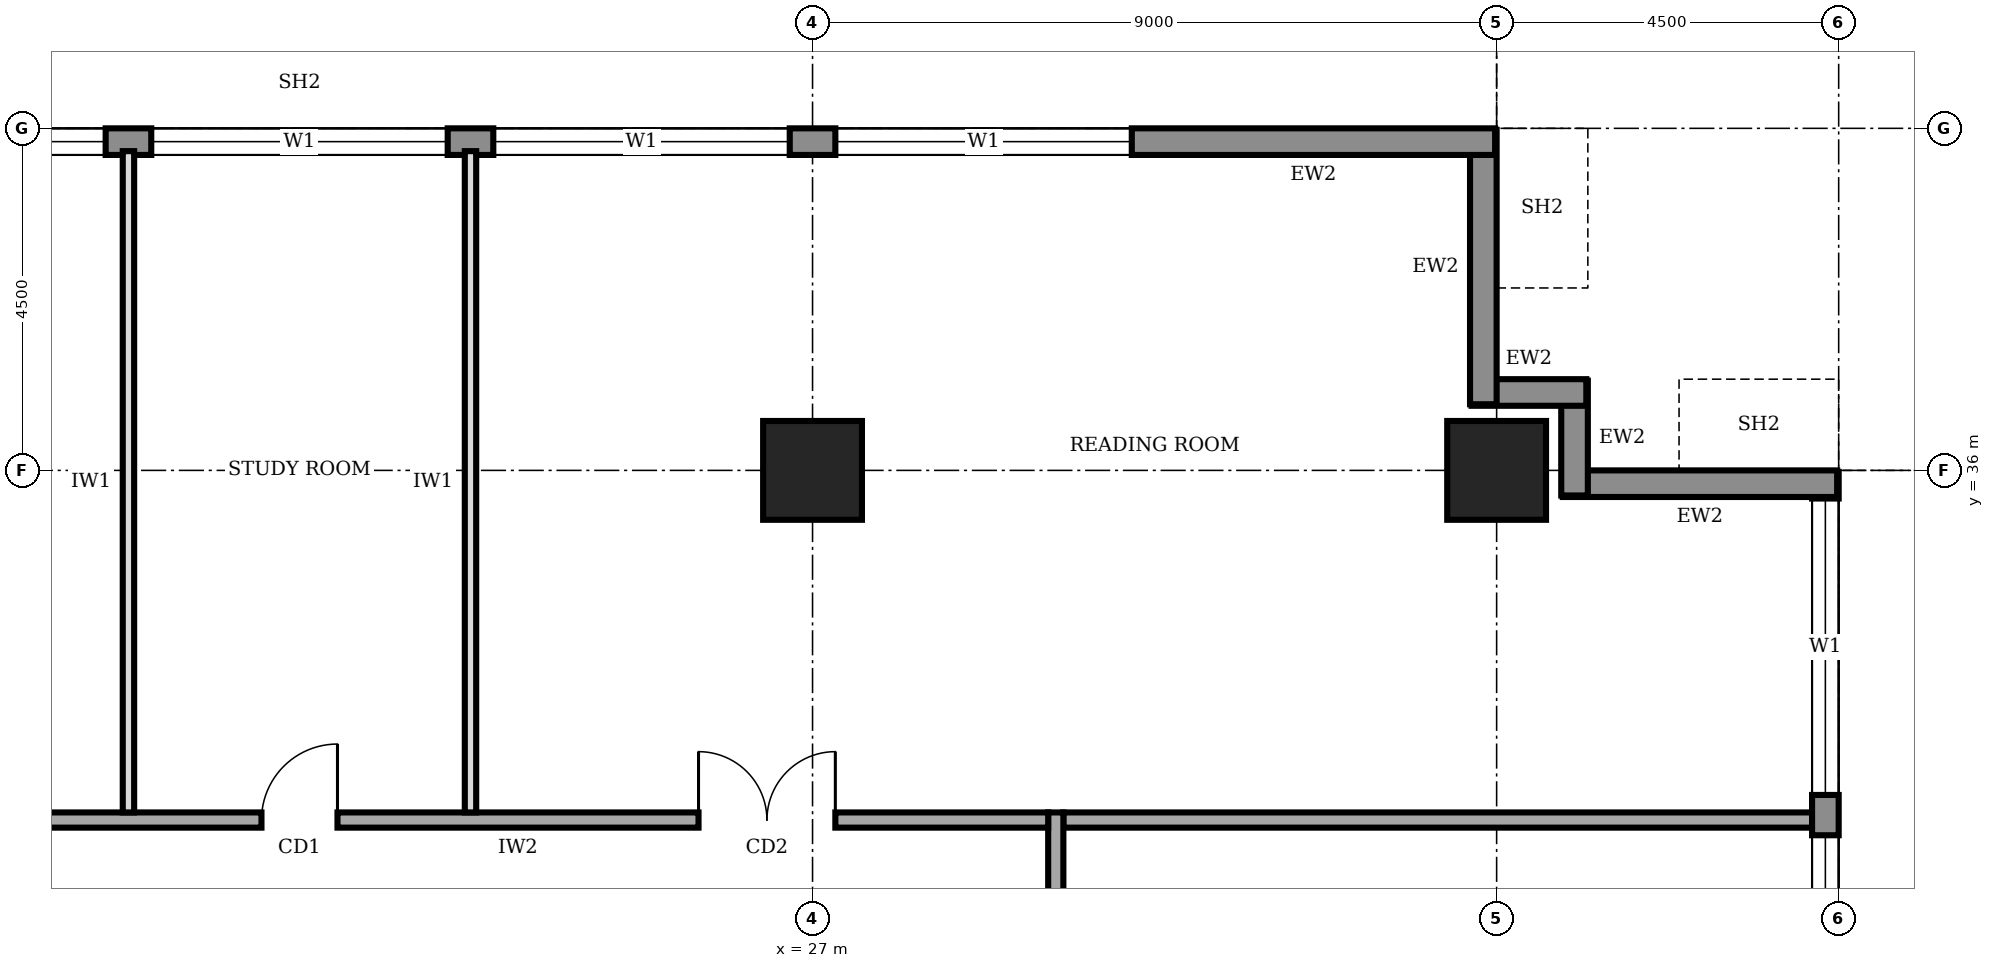
"""IFC4 building model, lengths in metres.
Left out: names, types, materials, properties, quantities, classifications, styles, units other than length and angle.
Written with IfcOpenShell. Run it as: python <this file> out.ifc"""

import sys

from ifc_helpers import new_model, si_unit, direction, frame, frame_2d, origin, origin_2d, place, context, subcontext, project, spatial, rectangle, extrude, element, fill, save


model = new_model("IFC4")
c1 = context("Model", 3, precision=1e-05, world=origin(), true_north=direction((0.0, 1.0)))
c2 = subcontext(c1, "Body", "Model", "MODEL_VIEW")
j1 = project(units=[si_unit("LENGTHUNIT", "METRE"), si_unit("PLANEANGLEUNIT", "RADIAN")], contexts=[c1])
p1 = place(None, origin())
s1 = spatial("IfcSite", under=j1, at=p1, CompositionType="ELEMENT")
p2 = place(p1, origin())
s2 = spatial("IfcBuilding", under=s1, at=p2, CompositionType="ELEMENT")
p3 = place(p2, frame((0.0, 0.0, 285.0)))
s3 = spatial("IfcBuildingStorey", under=s2, at=p3, CompositionType="ELEMENT", Elevation=285.0)
for number, where, z_axis, x_axis in (
    (1, (27.0, 36.0, 0.0), (0.0, 0.0, 1.0), (1.0, 0.0, 0.0)),
    (2, (36.0, 36.0, 0.0), (0.0, 0.0, 1.0), (1.0, 0.0, 0.0)),
):
    element("IfcColumn", number, at=place(p3, frame(where, z_axis=z_axis, x_axis=x_axis)), inside=s3, PredefinedType="COLUMN", context=c2, shape_type="SweptSolid", body=[
        extrude(rectangle(XDim=1.3, YDim=1.3, at=origin_2d()), origin(), (0.0, 0.0, 1.0), 4.0),
    ])
p4 = place(p3, frame((40.325, 4.52, 0.0), z_axis=(0.0, 0.0, 1.0), x_axis=(0.0, 1.0, 0.0)))
e3 = element("IfcWall", 3, at=p4, inside=s3, PredefinedType="STANDARD", context=c2, shape_type="SweptSolid", body=[
    extrude(rectangle(XDim=31.46, YDim=0.35, at=frame_2d((15.73, 0.0))), origin(), (0.0, 0.0, 1.0), 3.75),
])
p5 = place(p4, frame((4.78, 0.0, 0.9)))
e4 = element("IfcOpeningElement", 4, at=p5, cuts=e3, PredefinedType="OPENING", context=c2, shape_type="SweptSolid", body=[
    extrude(rectangle(XDim=3.9, YDim=2.2, at=frame_2d((1.95, 1.1))), frame((0.0, 0.185, 0.0), z_axis=(0.0, -1.0, 0.0), x_axis=(1.0, 0.0, 0.0)), (0.0, 0.0, 1.0), 0.37),
])
p6 = place(p4, frame((9.28, 0.0, 0.9)))
e5 = element("IfcOpeningElement", 5, at=p6, cuts=e3, PredefinedType="OPENING", context=c2, shape_type="SweptSolid", body=[
    extrude(rectangle(XDim=3.9, YDim=2.2, at=frame_2d((1.95, 1.1))), frame((0.0, 0.185, 0.0), z_axis=(0.0, -1.0, 0.0), x_axis=(1.0, 0.0, 0.0)), (0.0, 0.0, 1.0), 0.37),
])
p7 = place(p4, frame((13.78, 0.0, 0.9)))
e6 = element("IfcOpeningElement", 6, at=p7, cuts=e3, PredefinedType="OPENING", context=c2, shape_type="SweptSolid", body=[
    extrude(rectangle(XDim=3.9, YDim=2.2, at=frame_2d((1.95, 1.1))), frame((0.0, 0.185, 0.0), z_axis=(0.0, -1.0, 0.0), x_axis=(1.0, 0.0, 0.0)), (0.0, 0.0, 1.0), 0.37),
])
p8 = place(p4, frame((18.28, 0.0, 0.9)))
e7 = element("IfcOpeningElement", 7, at=p8, cuts=e3, PredefinedType="OPENING", context=c2, shape_type="SweptSolid", body=[
    extrude(rectangle(XDim=3.9, YDim=2.2, at=frame_2d((1.95, 1.1))), frame((0.0, 0.185, 0.0), z_axis=(0.0, -1.0, 0.0), x_axis=(1.0, 0.0, 0.0)), (0.0, 0.0, 1.0), 0.37),
])
p9 = place(p4, frame((22.78, 0.0, 0.9)))
e8 = element("IfcOpeningElement", 8, at=p9, cuts=e3, PredefinedType="OPENING", context=c2, shape_type="SweptSolid", body=[
    extrude(rectangle(XDim=3.9, YDim=2.2, at=frame_2d((1.95, 1.1))), frame((0.0, 0.185, 0.0), z_axis=(0.0, -1.0, 0.0), x_axis=(1.0, 0.0, 0.0)), (0.0, 0.0, 1.0), 0.37),
])
p10 = place(p4, frame((27.21, 0.0, 0.9)))
e9 = element("IfcOpeningElement", 9, at=p10, cuts=e3, PredefinedType="OPENING", context=c2, shape_type="SweptSolid", body=[
    extrude(rectangle(XDim=3.9, YDim=2.2, at=frame_2d((1.95, 1.1))), frame((0.0, 0.185, 0.0), z_axis=(0.0, -1.0, 0.0), x_axis=(1.0, 0.0, 0.0)), (0.0, 0.0, 1.0), 0.37),
])
p11 = place(p3, frame((40.48, 35.825, 0.0), z_axis=(0.0, 0.0, 1.0), x_axis=(-1.0, 0.0, 0.0)))
e10 = element("IfcWall", 10, at=p11, inside=s3, PredefinedType="STANDARD", context=c2, shape_type="SweptSolid", body=[
    extrude(rectangle(XDim=3.61, YDim=0.35, at=frame_2d((1.805, 0.0))), origin(), (0.0, 0.0, 1.0), 2.65),
])
for number, where, z_axis, x_axis in (
    (11, (37.025, 35.67, 0.0), (0.0, 0.0, 1.0), (0.0, 1.0, 0.0)),
    (12, (37.18, 37.025, 0.0), (0.0, 0.0, 1.0), (-1.0, 0.0, 0.0)),
):
    element("IfcWall", number, at=place(p3, frame(where, z_axis=z_axis, x_axis=x_axis)), inside=s3, PredefinedType="STANDARD", context=c2, shape_type="SweptSolid", body=[
        extrude(rectangle(XDim=1.51, YDim=0.35, at=frame_2d((0.755, 0.0))), origin(), (0.0, 0.0, 1.0), 3.75),
    ])
p12 = place(p3, frame((35.825, 36.87, 0.0), z_axis=(0.0, 0.0, 1.0), x_axis=(0.0, 1.0, 0.0)))
e13 = element("IfcWall", 13, at=p12, inside=s3, PredefinedType="STANDARD", context=c2, shape_type="SweptSolid", body=[
    extrude(rectangle(XDim=3.61, YDim=0.35, at=frame_2d((1.805, 0.0))), origin(), (0.0, 0.0, 1.0), 2.65),
])
p13 = place(p3, frame((35.98, 40.325, 0.0), z_axis=(0.0, 0.0, 1.0), x_axis=(-1.0, 0.0, 0.0)))
e14 = element("IfcWall", 14, at=p13, inside=s3, PredefinedType="STANDARD", context=c2, shape_type="SweptSolid", body=[
    extrude(rectangle(XDim=31.46, YDim=0.35, at=frame_2d((15.73, 0.0))), origin(), (0.0, 0.0, 1.0), 3.75),
])
p14 = place(p13, frame((27.21, 0.0, 0.9)))
e15 = element("IfcOpeningElement", 15, at=p14, cuts=e14, PredefinedType="OPENING", context=c2, shape_type="SweptSolid", body=[
    extrude(rectangle(XDim=3.9, YDim=2.2, at=frame_2d((1.95, 1.1))), frame((0.0, 0.185, 0.0), z_axis=(0.0, -1.0, 0.0), x_axis=(1.0, 0.0, 0.0)), (0.0, 0.0, 1.0), 0.37),
])
p15 = place(p13, frame((22.78, 0.0, 0.9)))
e16 = element("IfcOpeningElement", 16, at=p15, cuts=e14, PredefinedType="OPENING", context=c2, shape_type="SweptSolid", body=[
    extrude(rectangle(XDim=3.9, YDim=2.2, at=frame_2d((1.95, 1.1))), frame((0.0, 0.185, 0.0), z_axis=(0.0, -1.0, 0.0), x_axis=(1.0, 0.0, 0.0)), (0.0, 0.0, 1.0), 0.37),
])
p16 = place(p13, frame((18.28, 0.0, 0.9)))
e17 = element("IfcOpeningElement", 17, at=p16, cuts=e14, PredefinedType="OPENING", context=c2, shape_type="SweptSolid", body=[
    extrude(rectangle(XDim=3.9, YDim=2.2, at=frame_2d((1.95, 1.1))), frame((0.0, 0.185, 0.0), z_axis=(0.0, -1.0, 0.0), x_axis=(1.0, 0.0, 0.0)), (0.0, 0.0, 1.0), 0.37),
])
p17 = place(p13, frame((13.78, 0.0, 0.9)))
e18 = element("IfcOpeningElement", 18, at=p17, cuts=e14, PredefinedType="OPENING", context=c2, shape_type="SweptSolid", body=[
    extrude(rectangle(XDim=3.9, YDim=2.2, at=frame_2d((1.95, 1.1))), frame((0.0, 0.185, 0.0), z_axis=(0.0, -1.0, 0.0), x_axis=(1.0, 0.0, 0.0)), (0.0, 0.0, 1.0), 0.37),
])
p18 = place(p13, frame((9.28, 0.0, 0.9)))
e19 = element("IfcOpeningElement", 19, at=p18, cuts=e14, PredefinedType="OPENING", context=c2, shape_type="SweptSolid", body=[
    extrude(rectangle(XDim=3.9, YDim=2.2, at=frame_2d((1.95, 1.1))), frame((0.0, 0.185, 0.0), z_axis=(0.0, -1.0, 0.0), x_axis=(1.0, 0.0, 0.0)), (0.0, 0.0, 1.0), 0.37),
])
p19 = place(p13, frame((4.78, 0.0, 0.9)))
e20 = element("IfcOpeningElement", 20, at=p19, cuts=e14, PredefinedType="OPENING", context=c2, shape_type="SweptSolid", body=[
    extrude(rectangle(XDim=3.9, YDim=2.2, at=frame_2d((1.95, 1.1))), frame((0.0, 0.185, 0.0), z_axis=(0.0, -1.0, 0.0), x_axis=(1.0, 0.0, 0.0)), (0.0, 0.0, 1.0), 0.37),
])
p20 = place(p3, frame((30.2, 9.2, 0.0), z_axis=(0.0, 0.0, 1.0), x_axis=(0.0, 1.0, 0.0)))
e21 = element("IfcWall", 21, at=p20, inside=s3, PredefinedType="SOLIDWALL", context=c2, shape_type="SweptSolid", body=[
    extrude(rectangle(XDim=22.3, YDim=0.2, at=frame_2d((11.15, 0.0))), origin(), (0.0, 0.0, 1.0), 3.75),
])
p21 = place(p20, frame((5.65, 0.0, 0.0)))
e22 = element("IfcOpeningElement", 22, at=p21, cuts=e21, PredefinedType="OPENING", context=c2, shape_type="SweptSolid", body=[
    extrude(rectangle(XDim=1.8, YDim=2.1, at=frame_2d((0.9, 1.05))), frame((0.0, 0.11, 0.0), z_axis=(0.0, -1.0, 0.0), x_axis=(1.0, 0.0, 0.0)), (0.0, 0.0, 1.0), 0.22),
])
p22 = place(p20, frame((17.3, 0.0, 0.0)))
e23 = element("IfcOpeningElement", 23, at=p22, cuts=e21, PredefinedType="OPENING", context=c2, shape_type="SweptSolid", body=[
    extrude(rectangle(XDim=1.0, YDim=2.1, at=frame_2d((0.5, 1.05))), frame((0.0, 0.11, 0.0), z_axis=(0.0, -1.0, 0.0), x_axis=(1.0, 0.0, 0.0)), (0.0, 0.0, 1.0), 0.22),
])
p23 = place(p3, frame((30.1, 31.4, 0.0), z_axis=(0.0, 0.0, 1.0), x_axis=(-1.0, 0.0, 0.0)))
e24 = element("IfcWall", 24, at=p23, inside=s3, PredefinedType="SOLIDWALL", context=c2, shape_type="SweptSolid", body=[
    extrude(rectangle(XDim=18.4, YDim=0.2, at=frame_2d((9.2, 0.0))), origin(), (0.0, 0.0, 1.0), 3.75),
])
p24 = place(p23, frame((14.35, 0.0, 0.0)))
e25 = element("IfcOpeningElement", 25, at=p24, cuts=e24, PredefinedType="OPENING", context=c2, shape_type="SweptSolid", body=[
    extrude(rectangle(XDim=1.8, YDim=2.1, at=frame_2d((0.9, 1.05))), frame((0.0, 0.11, 0.0), z_axis=(0.0, -1.0, 0.0), x_axis=(1.0, 0.0, 0.0)), (0.0, 0.0, 1.0), 0.22),
])
p25 = place(p23, frame((9.35, 0.0, 0.0)))
e26 = element("IfcOpeningElement", 26, at=p25, cuts=e24, PredefinedType="OPENING", context=c2, shape_type="SweptSolid", body=[
    extrude(rectangle(XDim=1.0, YDim=2.1, at=frame_2d((0.5, 1.05))), frame((0.0, 0.11, 0.0), z_axis=(0.0, -1.0, 0.0), x_axis=(1.0, 0.0, 0.0)), (0.0, 0.0, 1.0), 0.22),
])
p26 = place(p23, frame((2.8, 0.0, 0.0)))
e27 = element("IfcOpeningElement", 27, at=p26, cuts=e24, PredefinedType="OPENING", context=c2, shape_type="SweptSolid", body=[
    extrude(rectangle(XDim=1.8, YDim=2.1, at=frame_2d((0.9, 1.05))), frame((0.0, 0.11, 0.0), z_axis=(0.0, -1.0, 0.0), x_axis=(1.0, 0.0, 0.0)), (0.0, 0.0, 1.0), 0.22),
])
p27 = place(p3, frame((30.3, 31.4, 0.0), z_axis=(0.0, 0.0, 1.0), x_axis=(1.0, 0.0, 0.0)))
e28 = element("IfcWall", 28, at=p27, inside=s3, PredefinedType="SOLIDWALL", context=c2, shape_type="SweptSolid", body=[
    extrude(rectangle(XDim=9.9, YDim=0.2, at=frame_2d((4.95, 0.0))), origin(), (0.0, 0.0, 1.0), 3.75),
])
for number, where, z_axis, x_axis in (
    (29, (18.0, 31.5, 0.0), (0.0, 0.0, 1.0), (0.0, 1.0, 0.0)),
    (30, (22.5, 31.5, 0.0), (0.0, 0.0, 1.0), (0.0, 1.0, 0.0)),
):
    element("IfcWall", number, at=place(p3, frame(where, z_axis=z_axis, x_axis=x_axis)), inside=s3, PredefinedType="PARTITIONING", context=c2, shape_type="SweptSolid", body=[
        extrude(rectangle(XDim=8.7, YDim=0.15, at=frame_2d((4.35, 0.0))), origin(), (0.0, 0.0, 1.0), 3.75),
    ])
p28 = place(p9, origin())
e31 = element("IfcWindow", 31, at=p28, inside=s3, PartitioningType="SINGLE_PANEL", PredefinedType="WINDOW", context=c2, shape_type="SweptSolid", body=[
    extrude(rectangle(XDim=3.9, YDim=2.2, at=frame_2d((1.95, 1.1))), frame((0.0, 0.03, 0.0), z_axis=(0.0, -1.0, 0.0), x_axis=(1.0, 0.0, 0.0)), (0.0, 0.0, 1.0), 0.06),
])
fill(e8, e31)
p29 = place(p10, origin())
e32 = element("IfcWindow", 32, at=p29, inside=s3, PartitioningType="SINGLE_PANEL", PredefinedType="WINDOW", context=c2, shape_type="SweptSolid", body=[
    extrude(rectangle(XDim=3.9, YDim=2.2, at=frame_2d((1.95, 1.1))), frame((0.0, 0.03, 0.0), z_axis=(0.0, -1.0, 0.0), x_axis=(1.0, 0.0, 0.0)), (0.0, 0.0, 1.0), 0.06),
])
fill(e9, e32)
p30 = place(p16, origin())
e33 = element("IfcWindow", 33, at=p30, inside=s3, PartitioningType="SINGLE_PANEL", PredefinedType="WINDOW", context=c2, shape_type="SweptSolid", body=[
    extrude(rectangle(XDim=3.9, YDim=2.2, at=frame_2d((1.95, 1.1))), frame((0.0, 0.03, 0.0), z_axis=(0.0, -1.0, 0.0), x_axis=(1.0, 0.0, 0.0)), (0.0, 0.0, 1.0), 0.06),
])
fill(e17, e33)
p31 = place(p17, origin())
e34 = element("IfcWindow", 34, at=p31, inside=s3, PartitioningType="SINGLE_PANEL", PredefinedType="WINDOW", context=c2, shape_type="SweptSolid", body=[
    extrude(rectangle(XDim=3.9, YDim=2.2, at=frame_2d((1.95, 1.1))), frame((0.0, 0.03, 0.0), z_axis=(0.0, -1.0, 0.0), x_axis=(1.0, 0.0, 0.0)), (0.0, 0.0, 1.0), 0.06),
])
fill(e18, e34)
p32 = place(p18, origin())
e35 = element("IfcWindow", 35, at=p32, inside=s3, PartitioningType="SINGLE_PANEL", PredefinedType="WINDOW", context=c2, shape_type="SweptSolid", body=[
    extrude(rectangle(XDim=3.9, YDim=2.2, at=frame_2d((1.95, 1.1))), frame((0.0, 0.03, 0.0), z_axis=(0.0, -1.0, 0.0), x_axis=(1.0, 0.0, 0.0)), (0.0, 0.0, 1.0), 0.06),
])
fill(e19, e35)
p33 = place(p19, origin())
e36 = element("IfcWindow", 36, at=p33, inside=s3, PartitioningType="SINGLE_PANEL", PredefinedType="WINDOW", context=c2, shape_type="SweptSolid", body=[
    extrude(rectangle(XDim=3.9, YDim=2.2, at=frame_2d((1.95, 1.1))), frame((0.0, 0.03, 0.0), z_axis=(0.0, -1.0, 0.0), x_axis=(1.0, 0.0, 0.0)), (0.0, 0.0, 1.0), 0.06),
])
fill(e20, e36)
p34 = place(p25, frame((1.0, 0.0, 0.0), z_axis=(0.0, 0.0, 1.0), x_axis=(-1.0, 0.0, 0.0)))
e37 = element("IfcDoor", 37, at=p34, inside=s3, OperationType="SINGLE_SWING_RIGHT", PredefinedType="DOOR", context=c2, shape_type="SweptSolid", body=[
    extrude(rectangle(XDim=1.0, YDim=2.1, at=frame_2d((0.5, 1.05))), frame((0.0, 0.025, 0.0), z_axis=(0.0, -1.0, 0.0), x_axis=(1.0, 0.0, 0.0)), (0.0, 0.0, 1.0), 0.05),
])
fill(e26, e37)
p35 = place(p26, frame((1.8, 0.0, 0.0), z_axis=(0.0, 0.0, 1.0), x_axis=(-1.0, 0.0, 0.0)))
e38 = element("IfcDoor", 38, at=p35, inside=s3, OperationType="DOUBLE_DOOR_SINGLE_SWING", PredefinedType="DOOR", context=c2, shape_type="SweptSolid", body=[
    extrude(rectangle(XDim=1.8, YDim=2.1, at=frame_2d((0.9, 1.05))), frame((0.0, 0.025, 0.0), z_axis=(0.0, -1.0, 0.0), x_axis=(1.0, 0.0, 0.0)), (0.0, 0.0, 1.0), 0.05),
])
fill(e27, e38)
save(model, sys.argv[1])
